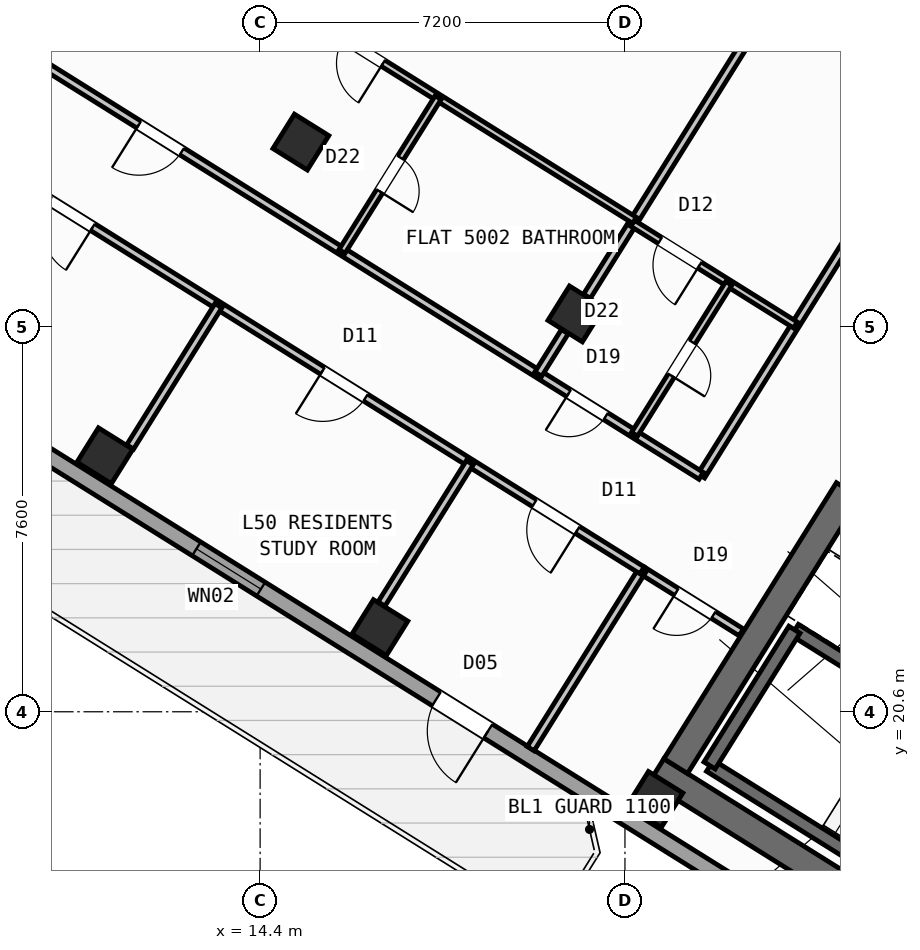
"""IFC4 building model, lengths in metres.
Left out: names, types, materials, properties, quantities, classifications, styles, units other than length and angle.
Written with IfcOpenShell. Run it as: python <this file> out.ifc"""

import sys

from ifc_helpers import new_model, si_unit, direction, frame, frame_2d, origin, origin_2d, place, context, subcontext, project, spatial, rectangle, hollow_rectangle, extrude, source, transform, mapped, element, fill, save


model = new_model("IFC4")
c1 = context("Model", 3, precision=1e-05, world=origin(), true_north=direction((0.0, 1.0)))
c2 = subcontext(c1, "Body", "Model", "MODEL_VIEW")
j1 = project(units=[si_unit("LENGTHUNIT", "METRE"), si_unit("PLANEANGLEUNIT", "RADIAN")], contexts=[c1])
p1 = place(None, origin())
s1 = spatial("IfcSite", under=j1, at=p1, CompositionType="ELEMENT")
p2 = place(p1, origin())
s2 = spatial("IfcBuilding", under=s1, at=p2, CompositionType="ELEMENT")
p3 = place(p2, frame((0.0, 0.0, 199.5)))
s3 = spatial("IfcBuildingStorey", under=s2, at=p3, CompositionType="ELEMENT", Elevation=199.5)
p4 = place(p3, frame((33.366, 12.477, 0.0), z_axis=(0.0, 0.0, 1.0), x_axis=(-0.848047359947, 0.529920442413, 0.0)))
e1 = element("IfcWall", 1, at=p4, inside=s3, PredefinedType="SHEAR", context=c2, shape_type="SweptSolid", body=[
    extrude(rectangle(XDim=13.14, YDim=0.55, at=frame_2d((6.57, 0.0))), origin(), (0.0, 0.0, 1.0), 4.25),
])
p5 = place(p3, frame((26.007, 24.976, 0.0), z_axis=(0.0, 0.0, 1.0), x_axis=(-0.529923795287, -0.848045264823, 0.0)))
e2 = element("IfcWall", 2, at=p5, inside=s3, PredefinedType="SHEAR", context=c2, shape_type="SweptSolid", body=[
    extrude(rectangle(XDim=6.425, YDim=0.55, at=frame_2d((3.212, 0.0))), origin(), (0.0, 0.0, 1.0), 4.25),
])
m1 = source(origin(), c2, "Body", "SweptSolid", [
    extrude(hollow_rectangle(XDim=0.8, YDim=0.8, WallThickness=0.032, at=origin_2d()), origin(), (0.0, 0.0, 1.0), 4.5),
])
for number, where, z_axis, x_axis in (
    (3, (22.191, 18.87, 0.0), (0.0, 0.0, 1.0), (-0.848, 0.53, 0.0)),
    (4, (20.632, 28.452, 0.0), (0.0, 0.0, 1.0), (-0.848, 0.53, 0.0)),
    (5, (16.764, 22.261, 0.0), (0.0, 0.0, 1.0), (-0.848, 0.53, 0.0)),
    (6, (15.205, 31.844, 0.0), (0.0, 0.0, 1.0), (-0.848, 0.53, 0.0)),
    (7, (11.336, 25.653, 0.0), (0.0, 0.0, 1.0), (-0.848, 0.53, 0.0)),
):
    element("IfcColumn", number, at=place(p3, frame(where, z_axis=z_axis, x_axis=x_axis)), inside=s3, PredefinedType="COLUMN", context=c2, shape_type="MappedRepresentation", body=[
        mapped(m1, transform((0.0, 0.0, 0.0), scale=1.0)),
    ])
p6 = place(p3, frame((31.76, 12.183, 0.0), z_axis=(0.0, 0.0, 1.0), x_axis=(-0.848047074256, 0.529920899612, 0.0)))
e8 = element("IfcWall", 8, at=p6, inside=s3, PredefinedType="STANDARD", context=c2, shape_type="SweptSolid", body=[
    extrude(rectangle(XDim=30.652, YDim=0.32, at=frame_2d((15.326, 0.0))), origin(), (0.0, 0.0, 1.0), 4.25),
])
p7 = place(p6, frame((15.166, 0.0, 0.0)))
e9 = element("IfcOpeningElement", 9, at=p7, cuts=e8, PredefinedType="OPENING", context=c2, shape_type="SweptSolid", body=[
    extrude(rectangle(XDim=1.2, YDim=2.15, at=frame_2d((0.6, 1.075))), frame((0.0, 0.17, 0.0), z_axis=(0.0, -1.0, 0.0), x_axis=(1.0, 0.0, 0.0)), (0.0, 0.0, 1.0), 0.34),
])
p8 = place(p6, frame((1.665, 0.0, 0.65)))
e10 = element("IfcOpeningElement", 10, at=p8, cuts=e8, PredefinedType="OPENING", context=c2, shape_type="SweptSolid", body=[
    extrude(rectangle(XDim=2.8, YDim=2.1, at=frame_2d((1.4, 1.05))), frame((0.0, 0.17, 0.0), z_axis=(0.0, -1.0, 0.0), x_axis=(1.0, 0.0, 0.0)), (0.0, 0.0, 1.0), 0.34),
])
p9 = place(p6, frame((6.894, 0.0, 0.65)))
e11 = element("IfcOpeningElement", 11, at=p9, cuts=e8, PredefinedType="OPENING", context=c2, shape_type="SweptSolid", body=[
    extrude(rectangle(XDim=2.8, YDim=2.1, at=frame_2d((1.4, 1.05))), frame((0.0, 0.17, 0.0), z_axis=(0.0, -1.0, 0.0), x_axis=(1.0, 0.0, 0.0)), (0.0, 0.0, 1.0), 0.34),
])
p10 = place(p6, frame((20.453, 0.0, 0.85)))
e12 = element("IfcOpeningElement", 12, at=p10, cuts=e8, PredefinedType="OPENING", context=c2, shape_type="SweptSolid", body=[
    extrude(rectangle(XDim=1.5, YDim=1.5, at=frame_2d((0.75, 0.75))), frame((0.0, 0.17, 0.0), z_axis=(0.0, -1.0, 0.0), x_axis=(1.0, 0.0, 0.0)), (0.0, 0.0, 1.0), 0.34),
])
p11 = place(p6, frame((26.258, 0.0, 0.65)))
e13 = element("IfcOpeningElement", 13, at=p11, cuts=e8, PredefinedType="OPENING", context=c2, shape_type="SweptSolid", body=[
    extrude(rectangle(XDim=2.8, YDim=2.1, at=frame_2d((1.4, 1.05))), frame((0.0, 0.17, 0.0), z_axis=(0.0, -1.0, 0.0), x_axis=(1.0, 0.0, 0.0)), (0.0, 0.0, 1.0), 0.34),
])
p12 = place(p3, frame((5.7, 28.71, 0.0), z_axis=(0.0, 0.0, 1.0), x_axis=(0.529923711467, 0.8480453172, 0.0)))
e14 = element("IfcWall", 14, at=p12, inside=s3, PredefinedType="STANDARD", context=c2, shape_type="SweptSolid", body=[
    extrude(rectangle(XDim=21.587, YDim=0.32, at=frame_2d((10.794, 0.0))), origin(), (0.0, 0.0, 1.0), 3.725),
])
p13 = place(p12, frame((1.604, 0.0, 0.85)))
e15 = element("IfcOpeningElement", 15, at=p13, cuts=e14, PredefinedType="OPENING", context=c2, shape_type="SweptSolid", body=[
    extrude(rectangle(XDim=1.5, YDim=1.5, at=frame_2d((0.75, 0.75))), frame((0.0, 0.17, 0.0), z_axis=(0.0, -1.0, 0.0), x_axis=(1.0, 0.0, 0.0)), (0.0, 0.0, 1.0), 0.34),
])
p14 = place(p12, frame((11.269, 0.0, 0.8)))
e16 = element("IfcOpeningElement", 16, at=p14, cuts=e14, PredefinedType="OPENING", context=c2, shape_type="SweptSolid", body=[
    extrude(rectangle(XDim=2.1, YDim=1.55, at=frame_2d((1.05, 0.775))), frame((0.0, 0.17, 0.0), z_axis=(0.0, -1.0, 0.0), x_axis=(1.0, 0.0, 0.0)), (0.0, 0.0, 1.0), 0.34),
])
p15 = place(p12, frame((17.406, 0.0, 0.85)))
e17 = element("IfcOpeningElement", 17, at=p15, cuts=e14, PredefinedType="OPENING", context=c2, shape_type="SweptSolid", body=[
    extrude(rectangle(XDim=1.5, YDim=1.5, at=frame_2d((0.75, 0.75))), frame((0.0, 0.17, 0.0), z_axis=(0.0, -1.0, 0.0), x_axis=(1.0, 0.0, 0.0)), (0.0, 0.0, 1.0), 0.34),
])
p16 = place(p3, frame((17.424, 47.083, 0.0), z_axis=(0.0, 0.0, 1.0), x_axis=(0.848049927979, -0.529916332693, 0.0)))
e18 = element("IfcWall", 18, at=p16, inside=s3, PredefinedType="STANDARD", context=c2, shape_type="SweptSolid", body=[
    extrude(rectangle(XDim=29.223, YDim=0.32, at=frame_2d((14.612, 0.0))), origin(), (0.0, 0.0, 1.0), 4.25),
])
p17 = place(p16, frame((2.949, 0.0, 0.0)))
e19 = element("IfcOpeningElement", 19, at=p17, cuts=e18, PredefinedType="OPENING", context=c2, shape_type="SweptSolid", body=[
    extrude(rectangle(XDim=1.05, YDim=2.15, at=frame_2d((0.525, 1.075))), frame((0.0, 0.17, 0.0), z_axis=(0.0, -1.0, 0.0), x_axis=(1.0, 0.0, 0.0)), (0.0, 0.0, 1.0), 0.34),
])
p18 = place(p16, frame((0.789, 0.0, 0.85)))
e20 = element("IfcOpeningElement", 20, at=p18, cuts=e18, PredefinedType="OPENING", context=c2, shape_type="SweptSolid", body=[
    extrude(rectangle(XDim=1.5, YDim=1.5, at=frame_2d((0.75, 0.75))), frame((0.0, 0.17, 0.0), z_axis=(0.0, -1.0, 0.0), x_axis=(1.0, 0.0, 0.0)), (0.0, 0.0, 1.0), 0.34),
])
p19 = place(p16, frame((8.329, 0.0, 0.8)))
e21 = element("IfcOpeningElement", 21, at=p19, cuts=e18, PredefinedType="OPENING", context=c2, shape_type="SweptSolid", body=[
    extrude(rectangle(XDim=2.1, YDim=1.55, at=frame_2d((1.05, 0.775))), frame((0.0, 0.17, 0.0), z_axis=(0.0, -1.0, 0.0), x_axis=(1.0, 0.0, 0.0)), (0.0, 0.0, 1.0), 0.34),
])
p20 = place(p16, frame((13.739, 0.0, 0.85)))
e22 = element("IfcOpeningElement", 22, at=p20, cuts=e18, PredefinedType="OPENING", context=c2, shape_type="SweptSolid", body=[
    extrude(rectangle(XDim=1.5, YDim=1.5, at=frame_2d((0.75, 0.75))), frame((0.0, 0.17, 0.0), z_axis=(0.0, -1.0, 0.0), x_axis=(1.0, 0.0, 0.0)), (0.0, 0.0, 1.0), 0.34),
])
p21 = place(p16, frame((21.114, 0.0, 0.65)))
e23 = element("IfcOpeningElement", 23, at=p21, cuts=e18, PredefinedType="OPENING", context=c2, shape_type="SweptSolid", body=[
    extrude(rectangle(XDim=2.8, YDim=2.1, at=frame_2d((1.4, 1.05))), frame((0.0, 0.17, 0.0), z_axis=(0.0, -1.0, 0.0), x_axis=(1.0, 0.0, 0.0)), (0.0, 0.0, 1.0), 0.34),
])
p22 = place(p16, frame((26.784, 0.0, 0.85)))
e24 = element("IfcOpeningElement", 24, at=p22, cuts=e18, PredefinedType="OPENING", context=c2, shape_type="SweptSolid", body=[
    extrude(rectangle(XDim=1.5, YDim=1.5, at=frame_2d((0.75, 0.75))), frame((0.0, 0.17, 0.0), z_axis=(0.0, -1.0, 0.0), x_axis=(1.0, 0.0, 0.0)), (0.0, 0.0, 1.0), 0.34),
])
p23 = place(p3, frame((29.605, 15.581, 0.0), z_axis=(0.0, 0.0, 1.0), x_axis=(-0.848036911448, 0.529937163087, 0.0)))
e25 = element("IfcWall", 25, at=p23, inside=s3, PredefinedType="SHEAR", context=c2, shape_type="SweptSolid", body=[
    extrude(rectangle(XDim=7.46, YDim=0.26, at=frame_2d((3.73, 0.0))), origin(), (0.0, 0.0, 1.0), 4.25),
])
p24 = place(p3, frame((31.28, 18.261, 0.0), z_axis=(0.0, 0.0, 1.0), x_axis=(-0.848051618787, 0.529913626805, 0.0)))
e26 = element("IfcWall", 26, at=p24, inside=s3, PredefinedType="SHEAR", context=c2, shape_type="SweptSolid", body=[
    extrude(rectangle(XDim=7.46, YDim=0.26, at=frame_2d((3.73, 0.0))), origin(), (0.0, 0.0, 1.0), 4.25),
])
p25 = place(p24, frame((0.36, 0.0, 0.0)))
e27 = element("IfcOpeningElement", 27, at=p25, cuts=e26, PredefinedType="OPENING", context=c2, shape_type="SweptSolid", body=[
    extrude(rectangle(XDim=0.86, YDim=2.05, at=frame_2d((0.43, 1.025))), frame((0.0, 0.14, 0.0), z_axis=(0.0, -1.0, 0.0), x_axis=(1.0, 0.0, 0.0)), (0.0, 0.0, 1.0), 0.28),
])
p26 = place(p3, frame((24.945, 22.22, 0.0), z_axis=(0.0, 0.0, 1.0), x_axis=(-0.529908658664, -0.84805472316, 0.0)))
e28 = element("IfcWall", 28, at=p26, inside=s3, PredefinedType="SHEAR", context=c2, shape_type="SweptSolid", body=[
    extrude(rectangle(XDim=3.16, YDim=0.26, at=frame_2d((1.58, 0.0))), origin(), (0.0, 0.0, 1.0), 4.25),
])
p27 = place(p3, frame((23.896, 22.168, 0.0), z_axis=(0.0, 0.0, 1.0), x_axis=(-0.848075553449, 0.529875320846, 0.0)))
e29 = element("IfcWall", 29, at=p27, inside=s3, PredefinedType="PARTITIONING", context=c2, shape_type="SweptSolid", body=[
    extrude(rectangle(XDim=2.308, YDim=0.16, at=frame_2d((1.154, 0.0))), origin(), (0.0, 0.0, 1.0), 4.24),
])
p28 = place(p27, frame((0.648, 0.0, 0.0)))
e30 = element("IfcOpeningElement", 30, at=p28, cuts=e29, PredefinedType="OPENING", context=c2, shape_type="SweptSolid", body=[
    extrude(rectangle(XDim=0.86, YDim=2.05, at=frame_2d((0.43, 1.025))), frame((0.0, 0.09, 0.0), z_axis=(0.0, -1.0, 0.0), x_axis=(1.0, 0.0, 0.0)), (0.0, 0.0, 1.0), 0.18),
])
p29 = place(p3, frame((31.239, 38.274, 0.0), z_axis=(0.0, 0.0, 1.0), x_axis=(-0.529918877109, -0.848048338059, 0.0)))
e31 = element("IfcWall", 31, at=p29, inside=s3, PredefinedType="PARTITIONING", context=c2, shape_type="SweptSolid", body=[
    extrude(rectangle(XDim=15.35, YDim=0.16, at=frame_2d((7.675, 0.0))), origin(), (0.0, 0.0, 1.0), 4.24),
])
p30 = place(p3, frame((21.938, 23.391, 0.0), z_axis=(0.0, 0.0, 1.0), x_axis=(-0.529940769753, -0.848034657637, 0.0)))
e32 = element("IfcWall", 32, at=p30, inside=s3, PredefinedType="PARTITIONING", context=c2, shape_type="SweptSolid", body=[
    extrude(rectangle(XDim=4.15, YDim=0.16, at=frame_2d((2.075, 0.0))), origin(), (0.0, 0.0, 1.0), 4.24),
])
p31 = place(p3, frame((23.104, 25.256, 0.0), z_axis=(0.0, 0.0, 1.0), x_axis=(-0.848041752158, 0.529929416617, 0.0)))
e33 = element("IfcWall", 33, at=p31, inside=s3, PredefinedType="PARTITIONING", context=c2, shape_type="SweptSolid", body=[
    extrude(rectangle(XDim=16.73, YDim=0.16, at=frame_2d((8.365, 0.0))), origin(), (0.0, 0.0, 1.0), 4.24),
])
p32 = place(p31, frame((2.22, 0.0, 0.0)))
e34 = element("IfcOpeningElement", 34, at=p32, cuts=e33, PredefinedType="OPENING", context=c2, shape_type="SweptSolid", body=[
    extrude(rectangle(XDim=0.86, YDim=2.05, at=frame_2d((0.43, 1.025))), frame((0.0, 0.09, 0.0), z_axis=(0.0, -1.0, 0.0), x_axis=(1.0, 0.0, 0.0)), (0.0, 0.0, 1.0), 0.18),
])
p33 = place(p31, frame((12.084, 0.0, 0.0)))
e35 = element("IfcOpeningElement", 35, at=p33, cuts=e33, PredefinedType="OPENING", context=c2, shape_type="SweptSolid", body=[
    extrude(rectangle(XDim=1.0, YDim=2.1, at=frame_2d((0.5, 1.05))), frame((0.0, 0.09, 0.0), z_axis=(0.0, -1.0, 0.0), x_axis=(1.0, 0.0, 0.0)), (0.0, 0.0, 1.0), 0.18),
])
p34 = place(p3, frame((21.938, 23.391, 0.0), z_axis=(0.0, 0.0, 1.0), x_axis=(-0.848045850158, 0.529922858565, 0.0)))
e36 = element("IfcWall", 36, at=p34, inside=s3, PredefinedType="PARTITIONING", context=c2, shape_type="SweptSolid", body=[
    extrude(rectangle(XDim=16.73, YDim=0.16, at=frame_2d((8.365, 0.0))), origin(), (0.0, 0.0, 1.0), 4.24),
])
p35 = place(p34, frame((1.505, 0.0, 0.0)))
e37 = element("IfcOpeningElement", 37, at=p35, cuts=e36, PredefinedType="OPENING", context=c2, shape_type="SweptSolid", body=[
    extrude(rectangle(XDim=1.0, YDim=2.1, at=frame_2d((0.5, 1.05))), frame((0.0, 0.09, 0.0), z_axis=(0.0, -1.0, 0.0), x_axis=(1.0, 0.0, 0.0)), (0.0, 0.0, 1.0), 0.18),
])
p36 = place(p34, frame((6.435, 0.0, 0.0)))
e38 = element("IfcOpeningElement", 38, at=p36, cuts=e36, PredefinedType="OPENING", context=c2, shape_type="SweptSolid", body=[
    extrude(rectangle(XDim=1.0, YDim=2.1, at=frame_2d((0.5, 1.05))), frame((0.0, 0.09, 0.0), z_axis=(0.0, -1.0, 0.0), x_axis=(1.0, 0.0, 0.0)), (0.0, 0.0, 1.0), 0.18),
])
p37 = place(p34, frame((12.784, 0.0, 0.0)))
e39 = element("IfcOpeningElement", 39, at=p37, cuts=e36, PredefinedType="OPENING", context=c2, shape_type="SweptSolid", body=[
    extrude(rectangle(XDim=1.0, YDim=2.1, at=frame_2d((0.5, 1.05))), frame((0.0, 0.09, 0.0), z_axis=(0.0, -1.0, 0.0), x_axis=(1.0, 0.0, 0.0)), (0.0, 0.0, 1.0), 0.18),
])
p38 = place(p3, frame((18.538, 25.516, 0.0), z_axis=(0.0, 0.0, 1.0), x_axis=(-0.529938869374, -0.84803584519, 0.0)))
e40 = element("IfcWall", 40, at=p38, inside=s3, PredefinedType="PARTITIONING", context=c2, shape_type="SweptSolid", body=[
    extrude(rectangle(XDim=3.288, YDim=0.16, at=frame_2d((1.644, 0.0))), origin(), (0.0, 0.0, 1.0), 3.725),
])
p39 = place(p3, frame((13.577, 28.615, 0.0), z_axis=(0.0, 0.0, 1.0), x_axis=(-0.529885466561, -0.848069214349, 0.0)))
e41 = element("IfcWall", 41, at=p39, inside=s3, PredefinedType="PARTITIONING", context=c2, shape_type="SweptSolid", body=[
    extrude(rectangle(XDim=3.288, YDim=0.16, at=frame_2d((1.644, 0.0))), origin(), (0.0, 0.0, 1.0), 4.24),
])
p40 = place(p3, frame((24.282, 34.293, 0.0), z_axis=(0.0, 0.0, 1.0), x_axis=(-0.529934553702, -0.848038542045, 0.0)))
e42 = element("IfcWall", 42, at=p40, inside=s3, PredefinedType="PARTITIONING", context=c2, shape_type="SweptSolid", body=[
    extrude(rectangle(XDim=6.476, YDim=0.16, at=frame_2d((3.238, 0.0))), origin(), (0.0, 0.0, 1.0), 3.725),
])
p41 = place(p3, frame((20.414, 28.103, 0.0), z_axis=(0.0, 0.0, 1.0), x_axis=(-0.529998940003, -0.847998304005, 0.0)))
e43 = element("IfcWall", 43, at=p41, inside=s3, PredefinedType="PARTITIONING", context=c2, shape_type="SweptSolid", body=[
    extrude(rectangle(XDim=0.988, YDim=0.16, at=frame_2d((0.494, 0.0))), origin(), (0.0, 0.0, 1.0), 3.725),
])
p42 = place(p3, frame((24.964, 28.233, 0.0), z_axis=(0.0, 0.0, 1.0), x_axis=(-0.848059820872, 0.529900500304, 0.0)))
e44 = element("IfcWall", 44, at=p42, inside=s3, PredefinedType="PLUMBINGWALL", context=c2, shape_type="SweptSolid", body=[
    extrude(rectangle(XDim=3.79, YDim=0.14, at=frame_2d((1.895, 0.0))), origin(), (0.0, 0.0, 1.0), 4.24),
])
p43 = place(p42, frame((2.23, 0.0, 0.0)))
e45 = element("IfcOpeningElement", 45, at=p43, cuts=e44, PredefinedType="OPENING", context=c2, shape_type="SweptSolid", body=[
    extrude(rectangle(XDim=0.92, YDim=2.08, at=frame_2d((0.46, 1.04))), frame((0.0, 0.08, 0.0), z_axis=(0.0, -1.0, 0.0), x_axis=(1.0, 0.0, 0.0)), (0.0, 0.0, 1.0), 0.16),
])
p44 = place(p3, frame((23.65, 29.054, 0.0), z_axis=(0.0, 0.0, 1.0), x_axis=(-0.529898896701, -0.848060822863, 0.0)))
e46 = element("IfcWall", 46, at=p44, inside=s3, PredefinedType="PLUMBINGWALL", context=c2, shape_type="SweptSolid", body=[
    extrude(rectangle(XDim=3.51, YDim=0.14, at=frame_2d((1.755, 0.0))), origin(), (0.0, 0.0, 1.0), 3.895),
])
p45 = place(p44, frame((1.365, 0.0, 0.0)))
e47 = element("IfcOpeningElement", 47, at=p45, cuts=e46, PredefinedType="OPENING", context=c2, shape_type="SweptSolid", body=[
    extrude(rectangle(XDim=0.78, YDim=2.05, at=frame_2d((0.39, 1.025))), frame((0.0, 0.08, 0.0), z_axis=(0.0, -1.0, 0.0), x_axis=(1.0, 0.0, 0.0)), (0.0, 0.0, 1.0), 0.16),
])
p46 = place(p3, frame((21.787, 30.301, 0.0), z_axis=(0.0, 0.0, 1.0), x_axis=(-0.848043949058, 0.52992590092, 0.0)))
e48 = element("IfcWall", 48, at=p46, inside=s3, PredefinedType="PLUMBINGWALL", context=c2, shape_type="SweptSolid", body=[
    extrude(rectangle(XDim=12.92, YDim=0.14, at=frame_2d((6.46, 0.0))), origin(), (0.0, 0.0, 1.0), 4.24),
])
p47 = place(p46, frame((5.849, 0.0, 0.0)))
e49 = element("IfcOpeningElement", 49, at=p47, cuts=e48, PredefinedType="OPENING", context=c2, shape_type="SweptSolid", body=[
    extrude(rectangle(XDim=0.92, YDim=2.08, at=frame_2d((0.46, 1.04))), frame((0.0, 0.08, 0.0), z_axis=(0.0, -1.0, 0.0), x_axis=(1.0, 0.0, 0.0)), (0.0, 0.0, 1.0), 0.16),
])
p48 = place(p3, frame((17.913, 32.721, 0.0), z_axis=(0.0, 0.0, 1.0), x_axis=(-0.529906983049, -0.848055770169, 0.0)))
e50 = element("IfcWall", 50, at=p48, inside=s3, PredefinedType="PLUMBINGWALL", context=c2, shape_type="SweptSolid", body=[
    extrude(rectangle(XDim=3.58, YDim=0.14, at=frame_2d((1.79, 0.0))), origin(), (0.0, 0.0, 1.0), 4.24),
])
p49 = place(p48, frame((1.4, 0.0, 0.0)))
e51 = element("IfcOpeningElement", 51, at=p49, cuts=e50, PredefinedType="OPENING", context=c2, shape_type="SweptSolid", body=[
    extrude(rectangle(XDim=0.78, YDim=2.05, at=frame_2d((0.39, 1.025))), frame((0.0, 0.08, 0.0), z_axis=(0.0, -1.0, 0.0), x_axis=(1.0, 0.0, 0.0)), (0.0, 0.0, 1.0), 0.16),
])
m2 = source(origin(), c2, "Body", "SweptSolid", [
    extrude(rectangle(XDim=1.2, YDim=2.15, at=frame_2d((0.6, 1.075))), frame((0.0, 0.025, 0.0), z_axis=(0.0, -1.0, 0.0), x_axis=(1.0, 0.0, 0.0)), (0.0, 0.0, 1.0), 0.05),
])
p50 = place(p7, origin())
e52 = element("IfcDoor", 52, at=p50, inside=s3, OperationType="SINGLE_SWING_LEFT", PredefinedType="DOOR", context=c2, shape_type="MappedRepresentation", body=[
    mapped(m2, transform((0.0, 0.0, 0.0), scale=1.0)),
])
fill(e9, e52)
m3 = source(origin(), c2, "Body", "SweptSolid", [
    extrude(rectangle(XDim=1.5, YDim=1.5, at=frame_2d((0.75, 0.75))), frame((0.0, 0.03, 0.0), z_axis=(0.0, -1.0, 0.0), x_axis=(1.0, 0.0, 0.0)), (0.0, 0.0, 1.0), 0.06),
])
p51 = place(p10, origin())
e53 = element("IfcWindow", 53, at=p51, inside=s3, PartitioningType="SINGLE_PANEL", PredefinedType="WINDOW", context=c2, shape_type="MappedRepresentation", body=[
    mapped(m3, transform((0.0, 0.0, 0.0), scale=1.0)),
])
fill(e12, e53)
m4 = source(origin(), c2, "Body", "SweptSolid", [
    extrude(rectangle(XDim=0.86, YDim=2.05, at=frame_2d((0.43, 1.025))), frame((0.0, 0.025, 0.0), z_axis=(0.0, -1.0, 0.0), x_axis=(1.0, 0.0, 0.0)), (0.0, 0.0, 1.0), 0.05),
])
p52 = place(p28, origin())
e54 = element("IfcDoor", 54, at=p52, inside=s3, OperationType="SINGLE_SWING_RIGHT", PredefinedType="DOOR", context=c2, shape_type="MappedRepresentation", body=[
    mapped(m4, transform((0.0, 0.0, 0.0), scale=1.0)),
])
fill(e30, e54)
m5 = source(origin(), c2, "Body", "SweptSolid", [
    extrude(rectangle(XDim=1.0, YDim=2.1, at=frame_2d((0.5, 1.05))), frame((0.0, 0.025, 0.0), z_axis=(0.0, -1.0, 0.0), x_axis=(1.0, 0.0, 0.0)), (0.0, 0.0, 1.0), 0.05),
])
p53 = place(p35, origin())
e55 = element("IfcDoor", 55, at=p53, inside=s3, OperationType="SINGLE_SWING_LEFT", PredefinedType="DOOR", context=c2, shape_type="MappedRepresentation", body=[
    mapped(m5, transform((0.0, 0.0, 0.0), scale=1.0)),
])
fill(e37, e55)
p54 = place(p36, origin())
e56 = element("IfcDoor", 56, at=p54, inside=s3, OperationType="SINGLE_SWING_RIGHT", PredefinedType="DOOR", context=c2, shape_type="MappedRepresentation", body=[
    mapped(m5, transform((0.0, 0.0, 0.0), scale=1.0)),
])
fill(e38, e56)
p55 = place(p37, origin())
e57 = element("IfcDoor", 57, at=p55, inside=s3, OperationType="SINGLE_SWING_LEFT", PredefinedType="DOOR", context=c2, shape_type="MappedRepresentation", body=[
    mapped(m5, transform((0.0, 0.0, 0.0), scale=1.0)),
])
fill(e39, e57)
p56 = place(p32, origin())
e58 = element("IfcDoor", 58, at=p56, inside=s3, OperationType="SINGLE_SWING_RIGHT", PredefinedType="DOOR", context=c2, shape_type="MappedRepresentation", body=[
    mapped(m4, transform((0.0, 0.0, 0.0), scale=1.0)),
])
fill(e34, e58)
m6 = source(origin(), c2, "Body", "SweptSolid", [
    extrude(rectangle(XDim=0.92, YDim=2.08, at=frame_2d((0.46, 1.04))), frame((0.0, 0.025, 0.0), z_axis=(0.0, -1.0, 0.0), x_axis=(1.0, 0.0, 0.0)), (0.0, 0.0, 1.0), 0.05),
])
p57 = place(p43, origin())
e59 = element("IfcDoor", 59, at=p57, inside=s3, OperationType="SINGLE_SWING_LEFT", PredefinedType="DOOR", context=c2, shape_type="MappedRepresentation", body=[
    mapped(m6, transform((0.0, 0.0, 0.0), scale=1.0)),
])
fill(e45, e59)
m7 = source(origin(), c2, "Body", "SweptSolid", [
    extrude(rectangle(XDim=0.78, YDim=2.05, at=frame_2d((0.39, 1.025))), frame((0.0, 0.025, 0.0), z_axis=(0.0, -1.0, 0.0), x_axis=(1.0, 0.0, 0.0)), (0.0, 0.0, 1.0), 0.05),
])
p58 = place(p45, origin())
e60 = element("IfcDoor", 60, at=p58, inside=s3, OperationType="SINGLE_SWING_RIGHT", PredefinedType="DOOR", context=c2, shape_type="MappedRepresentation", body=[
    mapped(m7, transform((0.0, 0.0, 0.0), scale=1.0)),
])
fill(e47, e60)
p59 = place(p33, origin())
e61 = element("IfcDoor", 61, at=p59, inside=s3, OperationType="SINGLE_SWING_RIGHT", PredefinedType="DOOR", context=c2, shape_type="MappedRepresentation", body=[
    mapped(m5, transform((0.0, 0.0, 0.0), scale=1.0)),
])
fill(e35, e61)
p60 = place(p47, origin())
e62 = element("IfcDoor", 62, at=p60, inside=s3, OperationType="SINGLE_SWING_LEFT", PredefinedType="DOOR", context=c2, shape_type="MappedRepresentation", body=[
    mapped(m6, transform((0.0, 0.0, 0.0), scale=1.0)),
])
fill(e49, e62)
p61 = place(p49, origin())
e63 = element("IfcDoor", 63, at=p61, inside=s3, OperationType="SINGLE_SWING_RIGHT", PredefinedType="DOOR", context=c2, shape_type="MappedRepresentation", body=[
    mapped(m7, transform((0.0, 0.0, 0.0), scale=1.0)),
])
fill(e51, e63)
save(model, sys.argv[1])
